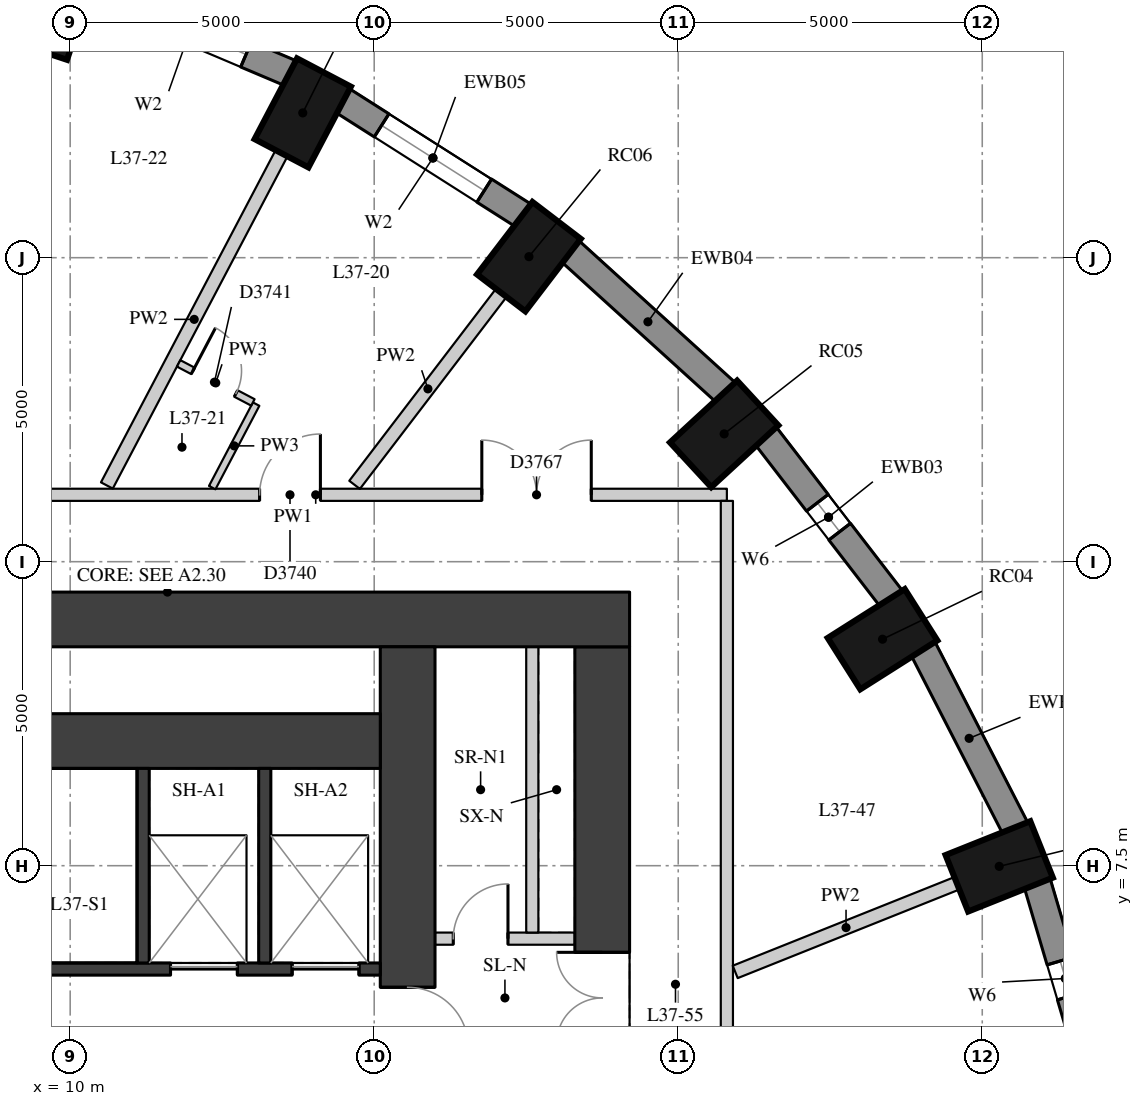
"""IFC4 building model, lengths in metres.
Left out: names, types, materials, properties, quantities, classifications, styles, units other than length and angle.
Written with IfcOpenShell. Run it as: python <this file> out.ifc"""

import sys

from ifc_helpers import new_model, si_unit, direction, frame, frame_2d, origin, origin_2d, place, context, subcontext, project, spatial, rectangle, extrude, element, fill, save


model = new_model("IFC4")
c1 = context("Model", 3, precision=1e-05, world=origin(), true_north=direction((0.0, 1.0)))
c2 = subcontext(c1, "Body", "Model", "MODEL_VIEW")
j1 = project(units=[si_unit("LENGTHUNIT", "METRE"), si_unit("PLANEANGLEUNIT", "RADIAN")], contexts=[c1])
p1 = place(None, origin())
s1 = spatial("IfcSite", under=j1, at=p1, CompositionType="ELEMENT")
p2 = place(p1, origin())
s2 = spatial("IfcBuilding", under=s1, at=p2, CompositionType="ELEMENT")
p3 = place(p2, frame((0.0, 0.0, 131.8)))
s3 = spatial("IfcBuildingStorey", under=s2, at=p3, CompositionType="ELEMENT", Elevation=131.8)
for number, where, z_axis, x_axis in (
    (1, (25.279, 7.489, 0.0), (0.0, 0.0, 1.0), (0.929, 0.371, 0.0)),
    (2, (23.36, 11.225, 0.0), (0.0, 0.0, 1.0), (0.845, 0.536, 0.0)),
    (3, (20.755, 14.602, 0.0), (0.0, 0.0, 1.0), (0.735, 0.678, 0.0)),
    (4, (17.545, 17.517, 0.0), (0.0, 0.0, 1.0), (0.607, 0.795, 0.0)),
    (5, (13.825, 19.882, 0.0), (0.0, 0.0, 1.0), (0.465, 0.885, 0.0)),
    (6, (9.71, 21.624, 0.0), (0.0, 0.0, 1.0), (0.315, 0.949, 0.0)),
):
    element("IfcColumn", number, at=place(p3, frame(where, z_axis=z_axis, x_axis=x_axis)), inside=s3, PredefinedType="COLUMN", context=c2, shape_type="SweptSolid", body=[
        extrude(rectangle(XDim=1.5, YDim=1.0, at=origin_2d()), origin(), (0.0, 0.0, 1.0), 3.3),
    ])
p4 = place(p3, frame((26.832, 4.069, 0.0), z_axis=(0.0, 0.0, 1.0), x_axis=(-0.283002902729, 0.959119052593, 0.0)))
e7 = element("IfcWall", 7, at=p4, inside=s3, PredefinedType="SOLIDWALL", context=c2, shape_type="SweptSolid", body=[
    extrude(rectangle(XDim=3.286, YDim=0.45, at=frame_2d((1.643, 0.0))), origin(), (0.0, 0.0, 1.0), 2.85),
])
p5 = place(p4, frame((1.343, 0.0, 0.4)))
e8 = element("IfcOpeningElement", 8, at=p5, cuts=e7, PredefinedType="OPENING", context=c2, shape_type="SweptSolid", body=[
    extrude(rectangle(XDim=0.6, YDim=1.75, at=frame_2d((0.3, 0.875))), frame((0.0, 0.235, 0.0), z_axis=(0.0, -1.0, 0.0), x_axis=(1.0, 0.0, 0.0)), (0.0, 0.0, 1.0), 0.47),
])
p6 = place(p3, frame((25.545, 8.112, 0.0), z_axis=(0.0, 0.0, 1.0), x_axis=(-0.456828186229, 0.889554949549, 0.0)))
e9 = element("IfcWall", 9, at=p6, inside=s3, PredefinedType="SOLIDWALL", context=c2, shape_type="SweptSolid", body=[
    extrude(rectangle(XDim=3.333, YDim=0.45, at=frame_2d((1.667, 0.0))), origin(), (0.0, 0.0, 1.0), 2.85),
])
p7 = place(p3, frame((23.508, 11.887, 0.0), z_axis=(0.0, 0.0, 1.0), x_axis=(-0.610693945156, 0.791866721961, 0.0)))
e10 = element("IfcWall", 10, at=p7, inside=s3, PredefinedType="SOLIDWALL", context=c2, shape_type="SweptSolid", body=[
    extrude(rectangle(XDim=3.395, YDim=0.45, at=frame_2d((1.697, 0.0))), origin(), (0.0, 0.0, 1.0), 2.85),
])
p8 = place(p7, frame((1.397, 0.0, 0.4)))
e11 = element("IfcOpeningElement", 11, at=p8, cuts=e10, PredefinedType="OPENING", context=c2, shape_type="SweptSolid", body=[
    extrude(rectangle(XDim=0.6, YDim=1.75, at=frame_2d((0.3, 0.875))), frame((0.0, 0.235, 0.0), z_axis=(0.0, -1.0, 0.0), x_axis=(1.0, 0.0, 0.0)), (0.0, 0.0, 1.0), 0.47),
])
p9 = place(p3, frame((20.784, 15.281, 0.0), z_axis=(0.0, 0.0, 1.0), x_axis=(-0.74032902847, 0.672244694739, 0.0)))
e12 = element("IfcWall", 12, at=p9, inside=s3, PredefinedType="SOLIDWALL", context=c2, shape_type="SweptSolid", body=[
    extrude(rectangle(XDim=3.464, YDim=0.45, at=frame_2d((1.732, 0.0))), origin(), (0.0, 0.0, 1.0), 2.85),
])
p10 = place(p3, frame((17.456, 18.192, 0.0), z_axis=(0.0, 0.0, 1.0), x_axis=(-0.843880549131, 0.536531097699, 0.0)))
e13 = element("IfcWall", 13, at=p10, inside=s3, PredefinedType="SOLIDWALL", context=c2, shape_type="SweptSolid", body=[
    extrude(rectangle(XDim=3.532, YDim=0.45, at=frame_2d((1.766, 0.0))), origin(), (0.0, 0.0, 1.0), 2.85),
])
p11 = place(p10, frame((0.766, 0.0, 0.4)))
e14 = element("IfcOpeningElement", 14, at=p11, cuts=e13, PredefinedType="OPENING", context=c2, shape_type="SweptSolid", body=[
    extrude(rectangle(XDim=2.0, YDim=1.75, at=frame_2d((1.0, 0.875))), frame((0.0, 0.235, 0.0), z_axis=(0.0, -1.0, 0.0), x_axis=(1.0, 0.0, 0.0)), (0.0, 0.0, 1.0), 0.47),
])
p12 = place(p3, frame((13.625, 20.533, 0.0), z_axis=(0.0, 0.0, 1.0), x_axis=(-0.920869643542, 0.389870619055, 0.0)))
e15 = element("IfcWall", 15, at=p12, inside=s3, PredefinedType="SOLIDWALL", context=c2, shape_type="SweptSolid", body=[
    extrude(rectangle(XDim=3.591, YDim=0.45, at=frame_2d((1.796, 0.0))), origin(), (0.0, 0.0, 1.0), 2.85),
])
p13 = place(p12, frame((0.796, 0.0, 0.4)))
e16 = element("IfcOpeningElement", 16, at=p13, cuts=e15, PredefinedType="OPENING", context=c2, shape_type="SweptSolid", body=[
    extrude(rectangle(XDim=2.0, YDim=1.75, at=frame_2d((1.0, 0.875))), frame((0.0, 0.235, 0.0), z_axis=(0.0, -1.0, 0.0), x_axis=(1.0, 0.0, 0.0)), (0.0, 0.0, 1.0), 0.47),
])
p14 = place(p3, frame((18.75, -11.1, 0.0), z_axis=(0.0, 0.0, 1.0), x_axis=(0.0, 1.0, 0.0)))
e17 = element("IfcWall", 17, at=p14, inside=s3, PredefinedType="SHEAR", context=c2, shape_type="SweptSolid", body=[
    extrude(rectangle(XDim=22.2, YDim=0.9, at=frame_2d((11.1, 0.0))), origin(), (0.0, 0.0, 1.0), 2.85),
])
p15 = place(p14, frame((15.675, 0.0, 0.0)))
e18 = element("IfcOpeningElement", 18, at=p15, cuts=e17, PredefinedType="OPENING", context=c2, shape_type="SweptSolid", body=[
    extrude(rectangle(XDim=1.5, YDim=2.1, at=frame_2d((0.75, 1.05))), frame((0.0, 0.46, 0.0), z_axis=(0.0, -1.0, 0.0), x_axis=(1.0, 0.0, 0.0)), (0.0, 0.0, 1.0), 0.92),
])
p16 = place(p14, frame((4.775, 0.0, 0.0)))
e19 = element("IfcOpeningElement", 19, at=p16, cuts=e17, PredefinedType="OPENING", context=c2, shape_type="SweptSolid", body=[
    extrude(rectangle(XDim=1.5, YDim=2.1, at=frame_2d((0.75, 1.05))), frame((0.0, 0.46, 0.0), z_axis=(0.0, -1.0, 0.0), x_axis=(1.0, 0.0, 0.0)), (0.0, 0.0, 1.0), 0.92),
])
p17 = place(p3, frame((4.0, 11.55, 0.0), z_axis=(0.0, 0.0, 1.0), x_axis=(1.0, 0.0, 0.0)))
e20 = element("IfcWall", 20, at=p17, inside=s3, PredefinedType="SHEAR", context=c2, shape_type="SweptSolid", body=[
    extrude(rectangle(XDim=15.2, YDim=0.9, at=frame_2d((7.6, 0.0))), origin(), (0.0, 0.0, 1.0), 2.85),
])
p18 = place(p3, frame((15.55, -11.1, 0.0), z_axis=(0.0, 0.0, 1.0), x_axis=(0.0, 1.0, 0.0)))
e21 = element("IfcWall", 21, at=p18, inside=s3, PredefinedType="SHEAR", context=c2, shape_type="SweptSolid", body=[
    extrude(rectangle(XDim=22.2, YDim=0.9, at=frame_2d((11.1, 0.0))), origin(), (0.0, 0.0, 1.0), 2.85),
])
p19 = place(p18, frame((15.6, 0.0, 0.0)))
e22 = element("IfcOpeningElement", 22, at=p19, cuts=e21, PredefinedType="OPENING", context=c2, shape_type="SweptSolid", body=[
    extrude(rectangle(XDim=1.0, YDim=2.1, at=frame_2d((0.5, 1.05))), frame((0.0, 0.46, 0.0), z_axis=(0.0, -1.0, 0.0), x_axis=(1.0, 0.0, 0.0)), (0.0, 0.0, 1.0), 0.92),
])
p20 = place(p18, frame((5.6, 0.0, 0.0)))
e23 = element("IfcOpeningElement", 23, at=p20, cuts=e21, PredefinedType="OPENING", context=c2, shape_type="SweptSolid", body=[
    extrude(rectangle(XDim=1.0, YDim=2.1, at=frame_2d((0.5, 1.05))), frame((0.0, 0.46, 0.0), z_axis=(0.0, -1.0, 0.0), x_axis=(1.0, 0.0, 0.0)), (0.0, 0.0, 1.0), 0.92),
])
p21 = place(p3, frame((4.9, 9.55, 0.0), z_axis=(0.0, 0.0, 1.0), x_axis=(1.0, 0.0, 0.0)))
e24 = element("IfcWall", 24, at=p21, inside=s3, PredefinedType="SHEAR", context=c2, shape_type="SweptSolid", body=[
    extrude(rectangle(XDim=10.2, YDim=0.9, at=frame_2d((5.1, 0.0))), origin(), (0.0, 0.0, 1.0), 2.85),
])
p22 = place(p3, frame((4.9, 5.8, 0.0), z_axis=(0.0, 0.0, 1.0), x_axis=(1.0, 0.0, 0.0)))
e25 = element("IfcWall", 25, at=p22, inside=s3, PredefinedType="SHEAR", context=c2, shape_type="SweptSolid", body=[
    extrude(rectangle(XDim=10.2, YDim=0.2, at=frame_2d((5.1, 0.0))), origin(), (0.0, 0.0, 1.0), 2.85),
])
p23 = place(p22, frame((6.75, 0.0, 0.0)))
e26 = element("IfcOpeningElement", 26, at=p23, cuts=e25, PredefinedType="OPENING", context=c2, shape_type="SweptSolid", body=[
    extrude(rectangle(XDim=1.1, YDim=2.1, at=frame_2d((0.55, 1.05))), frame((0.0, 0.11, 0.0), z_axis=(0.0, -1.0, 0.0), x_axis=(1.0, 0.0, 0.0)), (0.0, 0.0, 1.0), 0.22),
])
p24 = place(p22, frame((8.75, 0.0, 0.0)))
e27 = element("IfcOpeningElement", 27, at=p24, cuts=e25, PredefinedType="OPENING", context=c2, shape_type="SweptSolid", body=[
    extrude(rectangle(XDim=1.1, YDim=2.1, at=frame_2d((0.55, 1.05))), frame((0.0, 0.11, 0.0), z_axis=(0.0, -1.0, 0.0), x_axis=(1.0, 0.0, 0.0)), (0.0, 0.0, 1.0), 0.22),
])
for number, where, z_axis, x_axis in (
    (28, (11.2, 5.9, 0.0), (0.0, 0.0, 1.0), (0.0, 1.0, 0.0)),
    (29, (13.2, 5.9, 0.0), (0.0, 0.0, 1.0), (0.0, 1.0, 0.0)),
):
    element("IfcWall", number, at=place(p3, frame(where, z_axis=z_axis, x_axis=x_axis)), inside=s3, PredefinedType="SHEAR", context=c2, shape_type="SweptSolid", body=[
        extrude(rectangle(XDim=3.2, YDim=0.2, at=frame_2d((1.6, 0.0))), origin(), (0.0, 0.0, 1.0), 2.85),
    ])
p25 = place(p3, frame((16.0, 6.3, 0.0), z_axis=(0.0, 0.0, 1.0), x_axis=(1.0, 0.0, 0.0)))
e30 = element("IfcWall", 30, at=p25, inside=s3, PredefinedType="PARTITIONING", context=c2, shape_type="SweptSolid", body=[
    extrude(rectangle(XDim=2.3, YDim=0.2, at=frame_2d((1.15, 0.0))), origin(), (0.0, 0.0, 1.0), 2.85),
])
p26 = place(p25, frame((0.3, 0.0, 0.0)))
e31 = element("IfcOpeningElement", 31, at=p26, cuts=e30, PredefinedType="OPENING", context=c2, shape_type="SweptSolid", body=[
    extrude(rectangle(XDim=0.9, YDim=2.1, at=frame_2d((0.45, 1.05))), frame((0.0, 0.11, 0.0), z_axis=(0.0, -1.0, 0.0), x_axis=(1.0, 0.0, 0.0)), (0.0, 0.0, 1.0), 0.22),
])
p27 = place(p3, frame((17.6, 6.4, 0.0), z_axis=(0.0, 0.0, 1.0), x_axis=(0.0, 1.0, 0.0)))
e32 = element("IfcWall", 32, at=p27, inside=s3, PredefinedType="PARTITIONING", context=c2, shape_type="SweptSolid", body=[
    extrude(rectangle(XDim=4.7, YDim=0.2, at=frame_2d((2.35, 0.0))), origin(), (0.0, 0.0, 1.0), 2.85),
])
p28 = place(p3, frame((7.276, 13.6, 0.0), z_axis=(0.0, 0.0, 1.0), x_axis=(1.0, 0.0, 0.0)))
e33 = element("IfcWall", 33, at=p28, inside=s3, PredefinedType="PARTITIONING", context=c2, shape_type="SweptSolid", body=[
    extrude(rectangle(XDim=13.524, YDim=0.2, at=frame_2d((6.762, 0.0))), origin(), (0.0, 0.0, 1.0), 2.85),
])
p29 = place(p28, frame((5.839, 0.0, 0.0)))
e34 = element("IfcOpeningElement", 34, at=p29, cuts=e33, PredefinedType="OPENING", context=c2, shape_type="SweptSolid", body=[
    extrude(rectangle(XDim=1.0, YDim=2.1, at=frame_2d((0.5, 1.05))), frame((0.0, 0.11, 0.0), z_axis=(0.0, -1.0, 0.0), x_axis=(1.0, 0.0, 0.0)), (0.0, 0.0, 1.0), 0.22),
])
p30 = place(p28, frame((1.073, 0.0, 0.0)))
e35 = element("IfcOpeningElement", 35, at=p30, cuts=e33, PredefinedType="OPENING", context=c2, shape_type="SweptSolid", body=[
    extrude(rectangle(XDim=0.9, YDim=2.1, at=frame_2d((0.45, 1.05))), frame((0.0, 0.11, 0.0), z_axis=(0.0, -1.0, 0.0), x_axis=(1.0, 0.0, 0.0)), (0.0, 0.0, 1.0), 0.22),
])
p31 = place(p28, frame((9.494, 0.0, 0.0)))
e36 = element("IfcOpeningElement", 36, at=p31, cuts=e33, PredefinedType="OPENING", context=c2, shape_type="SweptSolid", body=[
    extrude(rectangle(XDim=1.8, YDim=2.1, at=frame_2d((0.9, 1.05))), frame((0.0, 0.11, 0.0), z_axis=(0.0, -1.0, 0.0), x_axis=(1.0, 0.0, 0.0)), (0.0, 0.0, 1.0), 0.22),
])
p32 = place(p3, frame((20.8, 13.5, 0.0), z_axis=(0.0, 0.0, 1.0), x_axis=(0.0, -1.0, 0.0)))
e37 = element("IfcWall", 37, at=p32, inside=s3, PredefinedType="PARTITIONING", context=c2, shape_type="SweptSolid", body=[
    extrude(rectangle(XDim=27.1, YDim=0.2, at=frame_2d((13.55, 0.0))), origin(), (0.0, 0.0, 1.0), 2.85),
])
p33 = place(p32, frame((22.844, 0.0, 0.0)))
e38 = element("IfcOpeningElement", 38, at=p33, cuts=e37, PredefinedType="OPENING", context=c2, shape_type="SweptSolid", body=[
    extrude(rectangle(XDim=1.8, YDim=2.1, at=frame_2d((0.9, 1.05))), frame((0.0, 0.11, 0.0), z_axis=(0.0, -1.0, 0.0), x_axis=(1.0, 0.0, 0.0)), (0.0, 0.0, 1.0), 0.22),
])
p34 = place(p32, frame((16.35, 0.0, 0.0)))
e39 = element("IfcOpeningElement", 39, at=p34, cuts=e37, PredefinedType="OPENING", context=c2, shape_type="SweptSolid", body=[
    extrude(rectangle(XDim=1.8, YDim=2.1, at=frame_2d((0.9, 1.05))), frame((0.0, 0.11, 0.0), z_axis=(0.0, -1.0, 0.0), x_axis=(1.0, 0.0, 0.0)), (0.0, 0.0, 1.0), 0.22),
])
p35 = place(p32, frame((10.051, 0.0, 0.0)))
e40 = element("IfcOpeningElement", 40, at=p35, cuts=e37, PredefinedType="OPENING", context=c2, shape_type="SweptSolid", body=[
    extrude(rectangle(XDim=1.8, YDim=2.1, at=frame_2d((0.9, 1.05))), frame((0.0, 0.11, 0.0), z_axis=(0.0, -1.0, 0.0), x_axis=(1.0, 0.0, 0.0)), (0.0, 0.0, 1.0), 0.22),
])
p36 = place(p3, frame((24.583, 7.21, 0.0), z_axis=(0.0, 0.0, 1.0), x_axis=(-0.928528147853, -0.371262008083, 0.0)))
e41 = element("IfcWall", 41, at=p36, inside=s3, PredefinedType="PARTITIONING", context=c2, shape_type="SweptSolid", body=[
    extrude(rectangle(XDim=3.926, YDim=0.22, at=frame_2d((1.963, 0.0))), origin(), (0.0, 0.0, 1.0), 2.85),
])
p37 = place(p3, frame((17.089, 16.921, 0.0), z_axis=(0.0, 0.0, 1.0), x_axis=(-0.607055443677, -0.794659479464, 0.0)))
e42 = element("IfcWall", 42, at=p37, inside=s3, PredefinedType="PARTITIONING", context=c2, shape_type="SweptSolid", body=[
    extrude(rectangle(XDim=3.973, YDim=0.22, at=frame_2d((1.987, 0.0))), origin(), (0.0, 0.0, 1.0), 2.85),
])
p38 = place(p3, frame((13.476, 19.218, 0.0), z_axis=(0.0, 0.0, 1.0), x_axis=(-0.465345394262, -0.885129179295, 0.0)))
e43 = element("IfcWall", 43, at=p38, inside=s3, PredefinedType="PARTITIONING", context=c2, shape_type="SweptSolid", body=[
    extrude(rectangle(XDim=6.173, YDim=0.22, at=frame_2d((3.086, 0.0))), origin(), (0.0, 0.0, 1.0), 2.85),
])
p39 = place(p3, frame((12.336, 13.718, 0.0), z_axis=(0.0, 0.0, 1.0), x_axis=(0.465428746876, 0.88508535271, 0.0)))
e44 = element("IfcWall", 44, at=p39, inside=s3, PredefinedType="PARTITIONING", context=c2, shape_type="SweptSolid", body=[
    extrude(rectangle(XDim=1.552, YDim=0.12, at=frame_2d((0.776, 0.0))), origin(), (0.0, 0.0, 1.0), 2.85),
])
p40 = place(p3, frame((13.005, 15.12, 0.0), z_axis=(0.0, 0.0, 1.0), x_axis=(-0.885148383454, 0.465308864378, 0.0)))
e45 = element("IfcWall", 45, at=p40, inside=s3, PredefinedType="PARTITIONING", context=c2, shape_type="SweptSolid", body=[
    extrude(rectangle(XDim=1.38, YDim=0.12, at=frame_2d((0.69, 0.0))), origin(), (0.0, 0.0, 1.0), 2.85),
])
p41 = place(p40, frame((0.315, 0.0, 0.0)))
e46 = element("IfcOpeningElement", 46, at=p41, cuts=e45, PredefinedType="OPENING", context=c2, shape_type="SweptSolid", body=[
    extrude(rectangle(XDim=0.8, YDim=2.1, at=frame_2d((0.4, 1.05))), frame((0.0, 0.07, 0.0), z_axis=(0.0, -1.0, 0.0), x_axis=(1.0, 0.0, 0.0)), (0.0, 0.0, 1.0), 0.14),
])
p42 = place(p5, origin())
e47 = element("IfcWindow", 47, at=p42, inside=s3, PartitioningType="SINGLE_PANEL", PredefinedType="WINDOW", context=c2, shape_type="SweptSolid", body=[
    extrude(rectangle(XDim=0.6, YDim=1.75, at=frame_2d((0.3, 0.875))), frame((0.0, 0.035, 0.0), z_axis=(0.0, -1.0, 0.0), x_axis=(1.0, 0.0, 0.0)), (0.0, 0.0, 1.0), 0.06),
])
fill(e8, e47)
p43 = place(p8, origin())
e48 = element("IfcWindow", 48, at=p43, inside=s3, PartitioningType="SINGLE_PANEL", PredefinedType="WINDOW", context=c2, shape_type="SweptSolid", body=[
    extrude(rectangle(XDim=0.6, YDim=1.75, at=frame_2d((0.3, 0.875))), frame((0.0, 0.035, 0.0), z_axis=(0.0, -1.0, 0.0), x_axis=(1.0, 0.0, 0.0)), (0.0, 0.0, 1.0), 0.06),
])
fill(e11, e48)
p44 = place(p11, origin())
e49 = element("IfcWindow", 49, at=p44, inside=s3, PartitioningType="SINGLE_PANEL", PredefinedType="WINDOW", context=c2, shape_type="SweptSolid", body=[
    extrude(rectangle(XDim=2.0, YDim=1.75, at=frame_2d((1.0, 0.875))), frame((0.0, 0.035, 0.0), z_axis=(0.0, -1.0, 0.0), x_axis=(1.0, 0.0, 0.0)), (0.0, 0.0, 1.0), 0.06),
])
fill(e14, e49)
p45 = place(p13, origin())
e50 = element("IfcWindow", 50, at=p45, inside=s3, PartitioningType="SINGLE_PANEL", PredefinedType="WINDOW", context=c2, shape_type="SweptSolid", body=[
    extrude(rectangle(XDim=2.0, YDim=1.75, at=frame_2d((1.0, 0.875))), frame((0.0, 0.035, 0.0), z_axis=(0.0, -1.0, 0.0), x_axis=(1.0, 0.0, 0.0)), (0.0, 0.0, 1.0), 0.06),
])
fill(e16, e50)
p46 = place(p15, origin())
e51 = element("IfcDoor", 51, at=p46, inside=s3, OperationType="DOUBLE_DOOR_SINGLE_SWING", PredefinedType="DOOR", context=c2, shape_type="SweptSolid", body=[
    extrude(rectangle(XDim=1.5, YDim=2.1, at=frame_2d((0.75, 1.05))), frame((0.0, 0.025, 0.0), z_axis=(0.0, -1.0, 0.0), x_axis=(1.0, 0.0, 0.0)), (0.0, 0.0, 1.0), 0.05),
])
fill(e18, e51)
p47 = place(p23, origin())
e52 = element("IfcDoor", 52, at=p47, inside=s3, OperationType="DOUBLE_DOOR_SLIDING", PredefinedType="DOOR", context=c2, shape_type="SweptSolid", body=[
    extrude(rectangle(XDim=1.1, YDim=2.1, at=frame_2d((0.55, 1.05))), frame((0.0, 0.025, 0.0), z_axis=(0.0, -1.0, 0.0), x_axis=(1.0, 0.0, 0.0)), (0.0, 0.0, 1.0), 0.05),
])
fill(e26, e52)
p48 = place(p24, origin())
e53 = element("IfcDoor", 53, at=p48, inside=s3, OperationType="DOUBLE_DOOR_SLIDING", PredefinedType="DOOR", context=c2, shape_type="SweptSolid", body=[
    extrude(rectangle(XDim=1.1, YDim=2.1, at=frame_2d((0.55, 1.05))), frame((0.0, 0.025, 0.0), z_axis=(0.0, -1.0, 0.0), x_axis=(1.0, 0.0, 0.0)), (0.0, 0.0, 1.0), 0.05),
])
fill(e27, e53)
p49 = place(p19, origin())
e54 = element("IfcDoor", 54, at=p49, inside=s3, OperationType="SINGLE_SWING_RIGHT", PredefinedType="DOOR", context=c2, shape_type="SweptSolid", body=[
    extrude(rectangle(XDim=1.0, YDim=2.1, at=frame_2d((0.5, 1.05))), frame((0.0, 0.025, 0.0), z_axis=(0.0, -1.0, 0.0), x_axis=(1.0, 0.0, 0.0)), (0.0, 0.0, 1.0), 0.05),
])
fill(e22, e54)
p50 = place(p26, origin())
e55 = element("IfcDoor", 55, at=p50, inside=s3, OperationType="SINGLE_SWING_RIGHT", PredefinedType="DOOR", context=c2, shape_type="SweptSolid", body=[
    extrude(rectangle(XDim=0.9, YDim=2.1, at=frame_2d((0.45, 1.05))), frame((0.0, 0.025, 0.0), z_axis=(0.0, -1.0, 0.0), x_axis=(1.0, 0.0, 0.0)), (0.0, 0.0, 1.0), 0.05),
])
fill(e31, e55)
p51 = place(p29, origin())
e56 = element("IfcDoor", 56, at=p51, inside=s3, OperationType="SINGLE_SWING_RIGHT", PredefinedType="DOOR", context=c2, shape_type="SweptSolid", body=[
    extrude(rectangle(XDim=1.0, YDim=2.1, at=frame_2d((0.5, 1.05))), frame((0.0, 0.025, 0.0), z_axis=(0.0, -1.0, 0.0), x_axis=(1.0, 0.0, 0.0)), (0.0, 0.0, 1.0), 0.05),
])
fill(e34, e56)
p52 = place(p41, origin())
e57 = element("IfcDoor", 57, at=p52, inside=s3, OperationType="SINGLE_SWING_LEFT", PredefinedType="DOOR", context=c2, shape_type="SweptSolid", body=[
    extrude(rectangle(XDim=0.8, YDim=2.1, at=frame_2d((0.4, 1.05))), frame((0.0, 0.025, 0.0), z_axis=(0.0, -1.0, 0.0), x_axis=(1.0, 0.0, 0.0)), (0.0, 0.0, 1.0), 0.05),
])
fill(e46, e57)
p53 = place(p31, origin())
e58 = element("IfcDoor", 58, at=p53, inside=s3, OperationType="DOUBLE_DOOR_SINGLE_SWING", PredefinedType="DOOR", context=c2, shape_type="SweptSolid", body=[
    extrude(rectangle(XDim=1.8, YDim=2.1, at=frame_2d((0.9, 1.05))), frame((0.0, 0.025, 0.0), z_axis=(0.0, -1.0, 0.0), x_axis=(1.0, 0.0, 0.0)), (0.0, 0.0, 1.0), 0.05),
])
fill(e36, e58)
save(model, sys.argv[1])
